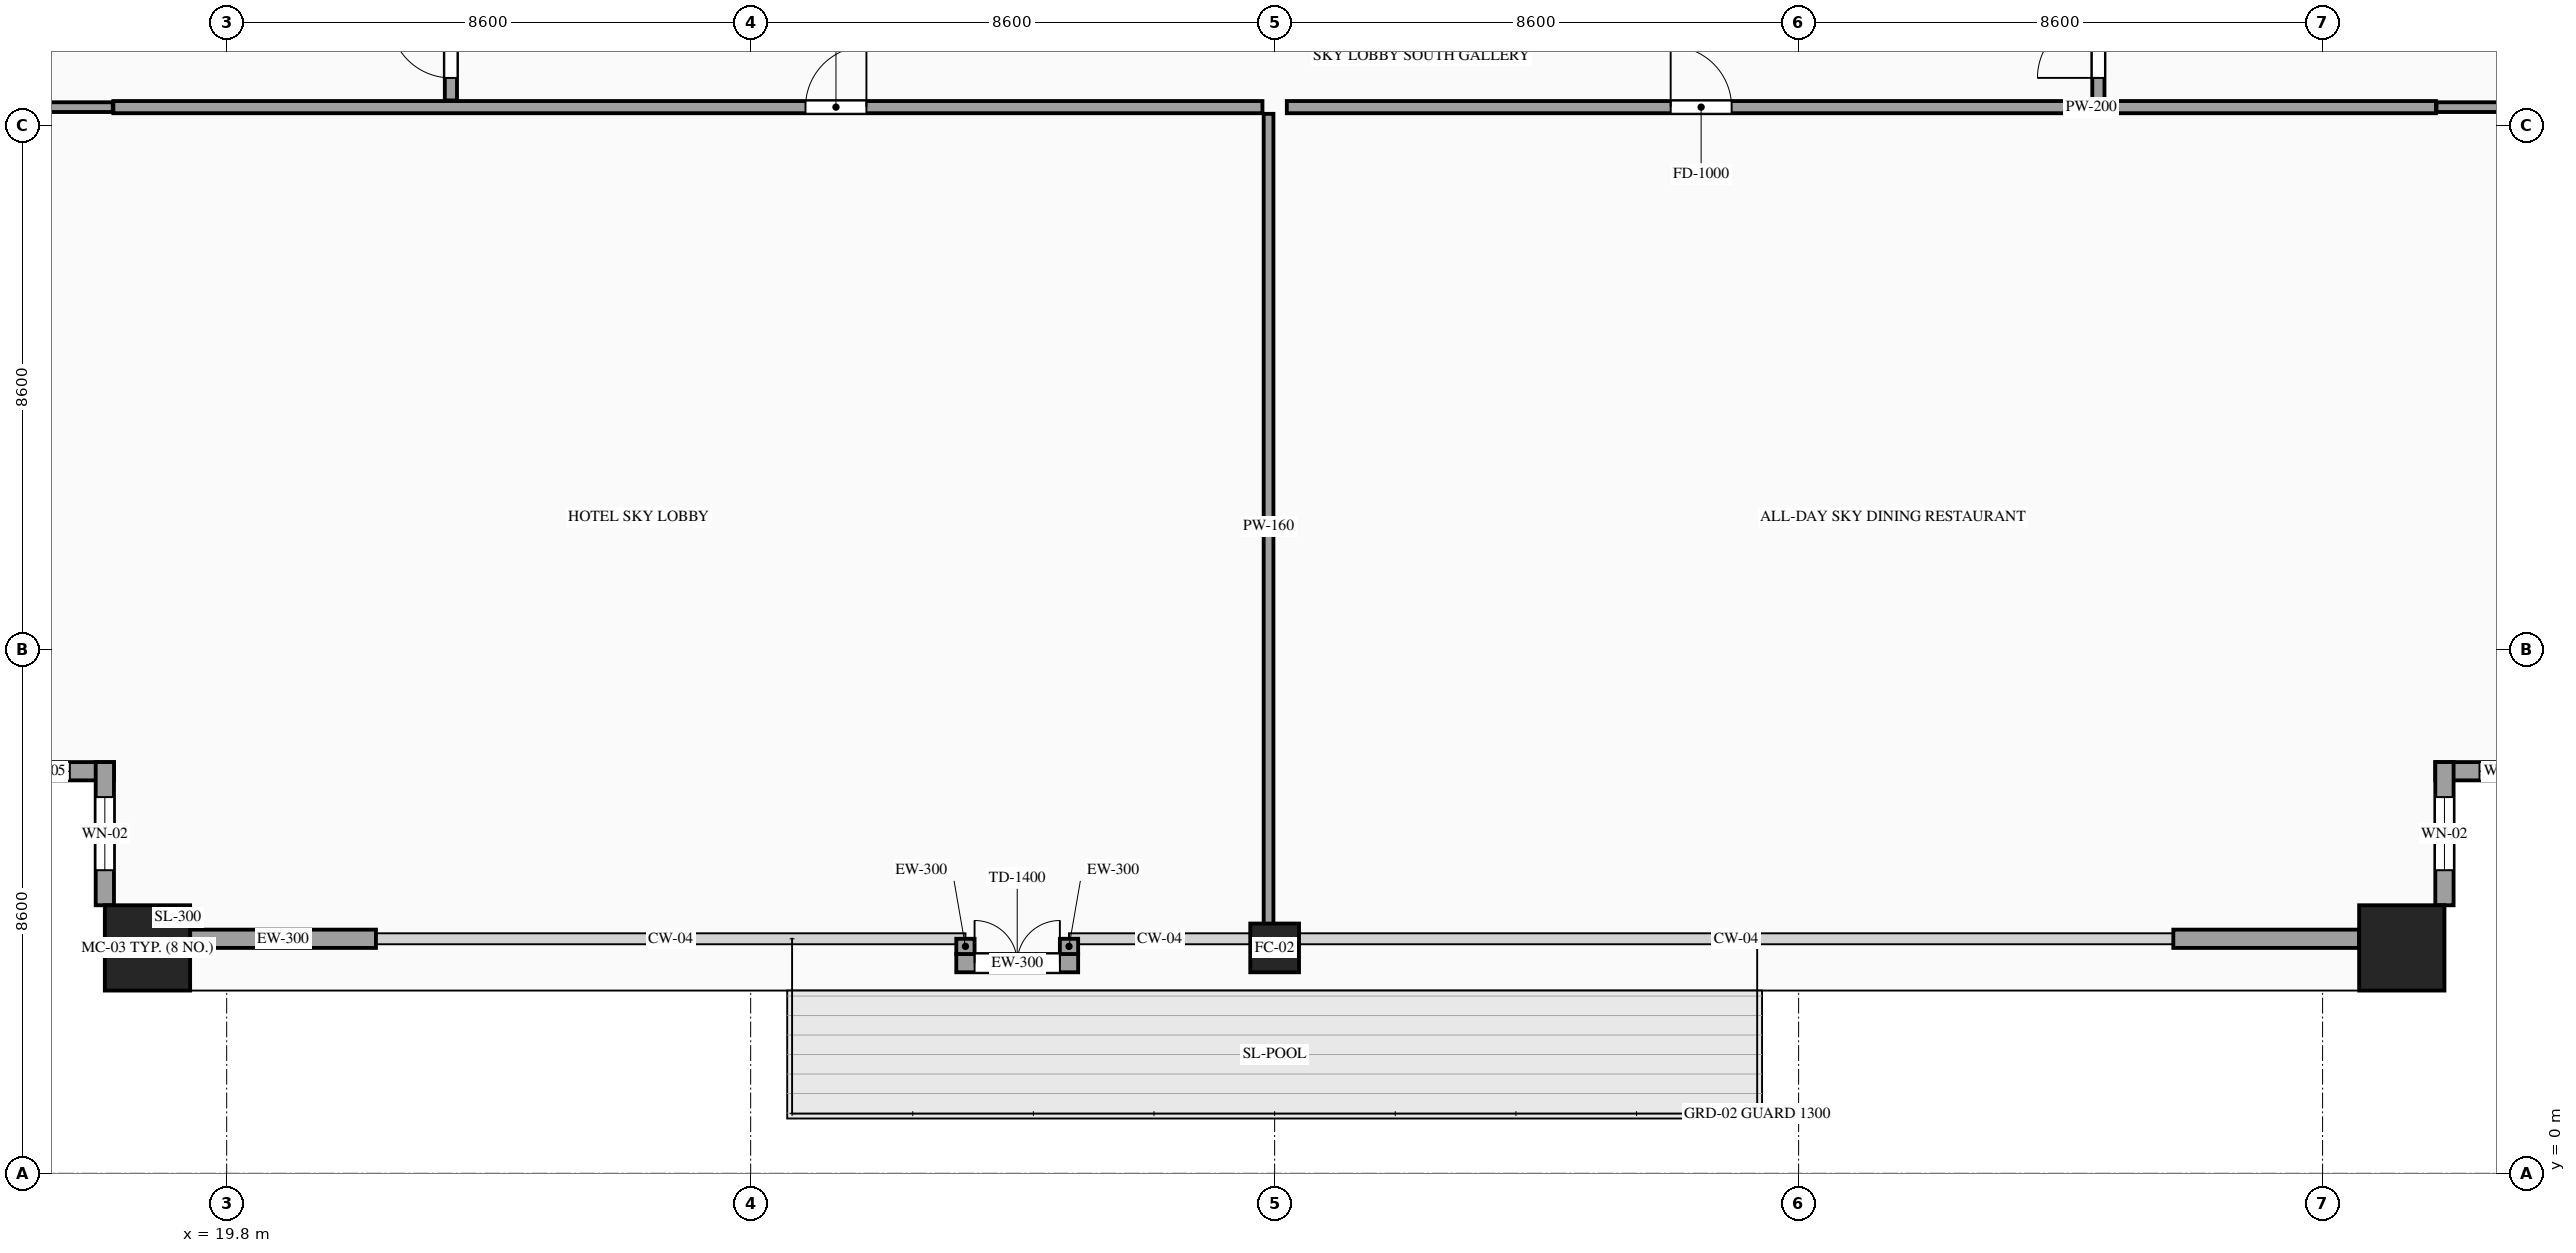
"""IFC4 building model, lengths in metres.
Left out: names, types, materials, properties, quantities, classifications, styles, units other than length and angle.
Written with IfcOpenShell. Run it as: python <this file> out.ifc"""

import sys

from ifc_helpers import new_model, si_unit, direction, frame, frame_2d, origin, origin_2d, place, context, subcontext, project, spatial, rectangle, hollow_rectangle, extrude, source, transform, mapped, element, fill, save


model = new_model("IFC4")
c1 = context("Model", 3, precision=1e-05, world=origin(), true_north=direction((0.0, 1.0)))
c2 = subcontext(c1, "Body", "Model", "MODEL_VIEW")
j1 = project(units=[si_unit("LENGTHUNIT", "METRE"), si_unit("PLANEANGLEUNIT", "RADIAN")], contexts=[c1])
p1 = place(None, origin())
s1 = spatial("IfcSite", under=j1, at=p1, CompositionType="ELEMENT")
p2 = place(p1, origin())
s2 = spatial("IfcBuilding", under=s1, at=p2, CompositionType="ELEMENT")
p3 = place(p2, frame((0.0, 0.0, 166.8)))
s3 = spatial("IfcBuildingStorey", under=s2, at=p3, CompositionType="ELEMENT", Elevation=166.8)
m1 = source(origin(), c2, "Body", "SweptSolid", [
    extrude(hollow_rectangle(XDim=1.4, YDim=1.4, WallThickness=0.06, at=origin_2d()), origin(), (0.0, 0.0, 1.0), 4.8),
])
p4 = place(p3, frame((18.5, 3.7, 0.0), z_axis=(0.0, 0.0, 1.0), x_axis=(1.0, 0.0, 0.0)))
e1 = element("IfcColumn", 1, at=p4, inside=s3, PredefinedType="COLUMN", context=c2, shape_type="MappedRepresentation", body=[
    mapped(m1, transform((0.0, 0.0, 0.0), scale=1.0)),
])
m2 = source(origin(), c2, "Body", "SweptSolid", [
    extrude(hollow_rectangle(XDim=0.8, YDim=0.8, WallThickness=0.036, at=origin_2d()), origin(), (0.0, 0.0, 1.0), 5.35),
])
p5 = place(p3, frame((37.0, 3.7, -0.55), z_axis=(0.0, 0.0, 1.0), x_axis=(1.0, 0.0, 0.0)))
e2 = element("IfcColumn", 2, at=p5, inside=s3, PredefinedType="COLUMN", context=c2, shape_type="MappedRepresentation", body=[
    mapped(m2, transform((0.0, 0.0, 0.0), scale=1.0)),
])
p6 = place(p3, frame((55.5, 3.7, 0.0), z_axis=(0.0, 0.0, 1.0), x_axis=(1.0, 0.0, 0.0)))
e3 = element("IfcColumn", 3, at=p6, inside=s3, PredefinedType="COLUMN", context=c2, shape_type="MappedRepresentation", body=[
    mapped(m1, transform((0.0, 0.0, 0.0), scale=1.0)),
])
p7 = place(p3, frame((15.6, 6.6, 0.0), z_axis=(0.0, 0.0, 1.0), x_axis=(1.0, 0.0, 0.0)))
e4 = element("IfcWall", 4, at=p7, inside=s3, PredefinedType="SOLIDWALL", context=c2, shape_type="SweptSolid", body=[
    extrude(rectangle(XDim=2.35, YDim=0.3, at=frame_2d((1.175, 0.0))), origin(), (0.0, 0.0, 1.0), 4.5),
])
p8 = place(p7, frame((0.725, 0.0, 0.85)))
e5 = element("IfcOpeningElement", 5, at=p8, cuts=e4, PredefinedType="OPENING", context=c2, shape_type="SweptSolid", body=[
    extrude(rectangle(XDim=0.9, YDim=1.5, at=frame_2d((0.45, 0.75))), frame((0.0, 0.165, 0.0), z_axis=(0.0, -1.0, 0.0), x_axis=(1.0, 0.0, 0.0)), (0.0, 0.0, 1.0), 0.33),
])
p9 = place(p3, frame((17.8, 6.75, 0.0), z_axis=(0.0, 0.0, 1.0), x_axis=(0.0, -1.0, 0.0)))
e6 = element("IfcWall", 6, at=p9, inside=s3, PredefinedType="SOLIDWALL", context=c2, shape_type="SweptSolid", body=[
    extrude(rectangle(XDim=2.35, YDim=0.3, at=frame_2d((1.175, 0.0))), origin(), (0.0, 0.0, 1.0), 4.5),
])
p10 = place(p9, frame((0.575, 0.0, 0.85)))
e7 = element("IfcOpeningElement", 7, at=p10, cuts=e6, PredefinedType="OPENING", context=c2, shape_type="SweptSolid", body=[
    extrude(rectangle(XDim=1.2, YDim=2.1, at=frame_2d((0.6, 1.05))), frame((0.0, 0.165, 0.0), z_axis=(0.0, -1.0, 0.0), x_axis=(1.0, 0.0, 0.0)), (0.0, 0.0, 1.0), 0.33),
])
p11 = place(p3, frame((56.05, 6.6, 0.0), z_axis=(0.0, 0.0, 1.0), x_axis=(1.0, 0.0, 0.0)))
e8 = element("IfcWall", 8, at=p11, inside=s3, PredefinedType="SOLIDWALL", context=c2, shape_type="SweptSolid", body=[
    extrude(rectangle(XDim=2.35, YDim=0.3, at=frame_2d((1.175, 0.0))), origin(), (0.0, 0.0, 1.0), 4.5),
])
p12 = place(p11, frame((0.725, 0.0, 0.85)))
e9 = element("IfcOpeningElement", 9, at=p12, cuts=e8, PredefinedType="OPENING", context=c2, shape_type="SweptSolid", body=[
    extrude(rectangle(XDim=0.9, YDim=1.5, at=frame_2d((0.45, 0.75))), frame((0.0, 0.165, 0.0), z_axis=(0.0, -1.0, 0.0), x_axis=(1.0, 0.0, 0.0)), (0.0, 0.0, 1.0), 0.33),
])
p13 = place(p3, frame((56.2, 4.4, 0.0), z_axis=(0.0, 0.0, 1.0), x_axis=(0.0, 1.0, 0.0)))
e10 = element("IfcWall", 10, at=p13, inside=s3, PredefinedType="SOLIDWALL", context=c2, shape_type="SweptSolid", body=[
    extrude(rectangle(XDim=2.35, YDim=0.3, at=frame_2d((1.175, 0.0))), origin(), (0.0, 0.0, 1.0), 4.5),
])
p14 = place(p13, frame((0.575, 0.0, 0.85)))
e11 = element("IfcOpeningElement", 11, at=p14, cuts=e10, PredefinedType="OPENING", context=c2, shape_type="SweptSolid", body=[
    extrude(rectangle(XDim=1.2, YDim=2.1, at=frame_2d((0.6, 1.05))), frame((0.0, 0.165, 0.0), z_axis=(0.0, -1.0, 0.0), x_axis=(1.0, 0.0, 0.0)), (0.0, 0.0, 1.0), 0.33),
])
m3 = source(origin(), c2, "Body", "SweptSolid", [
    extrude(rectangle(XDim=3.05, YDim=0.3, at=frame_2d((1.525, 0.0))), origin(), (0.0, 0.0, 1.0), 4.055),
])
for number, where, z_axis, x_axis in (
    (12, (19.2, 3.85, 0.0), (0.0, 0.0, 1.0), (1.0, 0.0, 0.0)),
    (13, (51.75, 3.85, 0.0), (0.0, 0.0, 1.0), (1.0, 0.0, 0.0)),
):
    element("IfcWall", number, at=place(p3, frame(where, z_axis=z_axis, x_axis=x_axis)), inside=s3, PredefinedType="SOLIDWALL", context=c2, shape_type="MappedRepresentation", body=[
        mapped(m3, transform((0.0, 0.0, 0.0), scale=1.0)),
    ])
p15 = place(p3, frame((31.775, 3.45, 0.0), z_axis=(0.0, 0.0, 1.0), x_axis=(1.0, 0.0, 0.0)))
e14 = element("IfcWall", 14, at=p15, inside=s3, PredefinedType="SOLIDWALL", context=c2, shape_type="SweptSolid", body=[
    extrude(rectangle(XDim=2.0, YDim=0.3, at=frame_2d((1.0, 0.0))), origin(), (0.0, 0.0, 1.0), 4.055),
])
p16 = place(p15, frame((0.3, 0.0, 0.0)))
e15 = element("IfcOpeningElement", 15, at=p16, cuts=e14, PredefinedType="OPENING", context=c2, shape_type="SweptSolid", body=[
    extrude(rectangle(XDim=1.4, YDim=2.3, at=frame_2d((0.7, 1.15))), frame((0.0, 0.165, 0.0), z_axis=(0.0, -1.0, 0.0), x_axis=(1.0, 0.0, 0.0)), (0.0, 0.0, 1.0), 0.33),
])
m4 = source(origin(), c2, "Body", "SweptSolid", [
    extrude(rectangle(XDim=0.25, YDim=0.3, at=frame_2d((0.125, 0.0))), origin(), (0.0, 0.0, 1.0), 4.5),
])
for number, where, z_axis, x_axis in (
    (16, (31.925, 3.85, 0.0), (0.0, 0.0, 1.0), (0.0, -1.0, 0.0)),
    (17, (33.625, 3.6, 0.0), (0.0, 0.0, 1.0), (0.0, 1.0, 0.0)),
):
    element("IfcWall", number, at=place(p3, frame(where, z_axis=z_axis, x_axis=x_axis)), inside=s3, PredefinedType="SOLIDWALL", context=c2, shape_type="MappedRepresentation", body=[
        mapped(m4, transform((0.0, 0.0, 0.0), scale=1.0)),
    ])
p17 = place(p3, frame((17.94, 17.5, 0.0), z_axis=(0.0, 0.0, 1.0), x_axis=(1.0, 0.0, 0.0)))
e18 = element("IfcWall", 18, at=p17, inside=s3, PredefinedType="PARTITIONING", context=c2, shape_type="SweptSolid", body=[
    extrude(rectangle(XDim=18.86, YDim=0.2, at=frame_2d((9.43, 0.0))), origin(), (0.0, 0.0, 1.0), 4.5),
])
p18 = place(p17, frame((11.36, 0.0, 0.0)))
e19 = element("IfcOpeningElement", 19, at=p18, cuts=e18, PredefinedType="OPENING", context=c2, shape_type="SweptSolid", body=[
    extrude(rectangle(XDim=1.0, YDim=2.2, at=frame_2d((0.5, 1.1))), frame((0.0, 0.115, 0.0), z_axis=(0.0, -1.0, 0.0), x_axis=(1.0, 0.0, 0.0)), (0.0, 0.0, 1.0), 0.23),
])
m5 = source(origin(), c2, "Body", "SweptSolid", [
    extrude(rectangle(XDim=13.54, YDim=0.16, at=frame_2d((6.77, 0.0))), origin(), (0.0, 0.0, 1.0), 3.907),
])
p19 = place(p3, frame((36.9, 3.85, 0.0), z_axis=(0.0, 0.0, 1.0), x_axis=(0.0, 1.0, 0.0)))
e20 = element("IfcWall", 20, at=p19, inside=s3, PredefinedType="PARTITIONING", context=c2, shape_type="MappedRepresentation", body=[
    mapped(m5, transform((0.0, 0.0, 0.0), scale=1.0)),
])
p20 = place(p3, frame((37.2, 17.5, 0.0), z_axis=(0.0, 0.0, 1.0), x_axis=(1.0, 0.0, 0.0)))
e21 = element("IfcWall", 21, at=p20, inside=s3, PredefinedType="PARTITIONING", context=c2, shape_type="SweptSolid", body=[
    extrude(rectangle(XDim=18.86, YDim=0.2, at=frame_2d((9.43, 0.0))), origin(), (0.0, 0.0, 1.0), 4.5),
])
p21 = place(p20, frame((6.3, 0.0, 0.0)))
e22 = element("IfcOpeningElement", 22, at=p21, cuts=e21, PredefinedType="OPENING", context=c2, shape_type="SweptSolid", body=[
    extrude(rectangle(XDim=1.0, YDim=2.2, at=frame_2d((0.5, 1.1))), frame((0.0, 0.115, 0.0), z_axis=(0.0, -1.0, 0.0), x_axis=(1.0, 0.0, 0.0)), (0.0, 0.0, 1.0), 0.23),
])
p22 = place(p3, frame((23.48, 17.61, 0.0), z_axis=(0.0, 0.0, 1.0), x_axis=(0.0, 1.0, 0.0)))
e23 = element("IfcWall", 23, at=p22, inside=s3, PredefinedType="PARTITIONING", context=c2, shape_type="SweptSolid", body=[
    extrude(rectangle(XDim=1.74, YDim=0.2, at=frame_2d((0.87, 0.0))), origin(), (0.0, 0.0, 1.0), 4.5),
])
p23 = place(p22, frame((0.37, 0.0, 0.0)))
e24 = element("IfcOpeningElement", 24, at=p23, cuts=e23, PredefinedType="OPENING", context=c2, shape_type="SweptSolid", body=[
    extrude(rectangle(XDim=1.0, YDim=2.2, at=frame_2d((0.5, 1.1))), frame((0.0, 0.115, 0.0), z_axis=(0.0, -1.0, 0.0), x_axis=(1.0, 0.0, 0.0)), (0.0, 0.0, 1.0), 0.23),
])
m6 = source(origin(), c2, "Body", "SweptSolid", [
    extrude(rectangle(XDim=2.88, YDim=0.16, at=frame_2d((1.44, 0.0))), origin(), (0.0, 0.0, 1.0), 4.5),
])
p24 = place(p3, frame((15.05, 17.5, 0.0), z_axis=(0.0, 0.0, 1.0), x_axis=(1.0, 0.0, 0.0)))
e25 = element("IfcWall", 25, at=p24, inside=s3, PredefinedType="PARTITIONING", context=c2, shape_type="MappedRepresentation", body=[
    mapped(m6, transform((0.0, 0.0, 0.0), scale=1.0)),
])
p25 = place(p3, frame((50.52, 17.61, 0.0), z_axis=(0.0, 0.0, 1.0), x_axis=(0.0, 1.0, 0.0)))
e26 = element("IfcWall", 26, at=p25, inside=s3, PredefinedType="PARTITIONING", context=c2, shape_type="SweptSolid", body=[
    extrude(rectangle(XDim=1.74, YDim=0.2, at=frame_2d((0.87, 0.0))), origin(), (0.0, 0.0, 1.0), 4.5),
])
p26 = place(p25, frame((0.37, 0.0, 0.0)))
e27 = element("IfcOpeningElement", 27, at=p26, cuts=e26, PredefinedType="OPENING", context=c2, shape_type="SweptSolid", body=[
    extrude(rectangle(XDim=1.0, YDim=2.2, at=frame_2d((0.5, 1.1))), frame((0.0, 0.115, 0.0), z_axis=(0.0, -1.0, 0.0), x_axis=(1.0, 0.0, 0.0)), (0.0, 0.0, 1.0), 0.23),
])
p27 = place(p3, frame((56.07, 17.5, 0.0), z_axis=(0.0, 0.0, 1.0), x_axis=(1.0, 0.0, 0.0)))
e28 = element("IfcWall", 28, at=p27, inside=s3, PredefinedType="PARTITIONING", context=c2, shape_type="MappedRepresentation", body=[
    mapped(m6, transform((0.0, 0.0, 0.0), scale=1.0)),
])
m7 = source(origin(), c2, "Body", "SweptSolid", [
    extrude(rectangle(XDim=0.9, YDim=1.5, at=frame_2d((0.45, 0.75))), frame((0.0, 0.03, 0.0), z_axis=(0.0, -1.0, 0.0), x_axis=(1.0, 0.0, 0.0)), (0.0, 0.0, 1.0), 0.06),
])
p28 = place(p8, origin())
e29 = element("IfcWindow", 29, at=p28, inside=s3, PartitioningType="SINGLE_PANEL", PredefinedType="WINDOW", context=c2, shape_type="MappedRepresentation", body=[
    mapped(m7, transform((0.0, 0.0, 0.0), scale=1.0)),
])
fill(e5, e29)
m8 = source(origin(), c2, "Body", "SweptSolid", [
    extrude(rectangle(XDim=1.2, YDim=2.1, at=frame_2d((0.6, 1.05))), frame((0.0, 0.03, 0.0), z_axis=(0.0, -1.0, 0.0), x_axis=(1.0, 0.0, 0.0)), (0.0, 0.0, 1.0), 0.06),
])
p29 = place(p10, origin())
e30 = element("IfcWindow", 30, at=p29, inside=s3, PartitioningType="SINGLE_PANEL", PredefinedType="WINDOW", context=c2, shape_type="MappedRepresentation", body=[
    mapped(m8, transform((0.0, 0.0, 0.0), scale=1.0)),
])
fill(e7, e30)
p30 = place(p12, origin())
e31 = element("IfcWindow", 31, at=p30, inside=s3, PartitioningType="SINGLE_PANEL", PredefinedType="WINDOW", context=c2, shape_type="MappedRepresentation", body=[
    mapped(m7, transform((0.0, 0.0, 0.0), scale=1.0)),
])
fill(e9, e31)
p31 = place(p14, origin())
e32 = element("IfcWindow", 32, at=p31, inside=s3, PartitioningType="SINGLE_PANEL", PredefinedType="WINDOW", context=c2, shape_type="MappedRepresentation", body=[
    mapped(m8, transform((0.0, 0.0, 0.0), scale=1.0)),
])
fill(e11, e32)
m9 = source(origin(), c2, "Body", "SweptSolid", [
    extrude(rectangle(XDim=1.4, YDim=2.3, at=frame_2d((0.7, 1.15))), frame((0.0, 0.025, 0.0), z_axis=(0.0, -1.0, 0.0), x_axis=(1.0, 0.0, 0.0)), (0.0, 0.0, 1.0), 0.05),
])
p32 = place(p16, origin())
e33 = element("IfcDoor", 33, at=p32, inside=s3, OperationType="DOUBLE_DOOR_SINGLE_SWING", PredefinedType="DOOR", context=c2, shape_type="MappedRepresentation", body=[
    mapped(m9, transform((0.0, 0.0, 0.0), scale=1.0)),
])
fill(e15, e33)
m10 = source(origin(), c2, "Body", "SweptSolid", [
    extrude(rectangle(XDim=1.0, YDim=2.2, at=frame_2d((0.5, 1.1))), frame((0.0, 0.025, 0.0), z_axis=(0.0, -1.0, 0.0), x_axis=(1.0, 0.0, 0.0)), (0.0, 0.0, 1.0), 0.05),
])
p33 = place(p18, origin())
e34 = element("IfcDoor", 34, at=p33, inside=s3, OperationType="SINGLE_SWING_RIGHT", PredefinedType="DOOR", context=c2, shape_type="MappedRepresentation", body=[
    mapped(m10, transform((0.0, 0.0, 0.0), scale=1.0)),
])
fill(e19, e34)
p34 = place(p21, origin())
e35 = element("IfcDoor", 35, at=p34, inside=s3, OperationType="SINGLE_SWING_LEFT", PredefinedType="DOOR", context=c2, shape_type="MappedRepresentation", body=[
    mapped(m10, transform((0.0, 0.0, 0.0), scale=1.0)),
])
fill(e22, e35)
p35 = place(p23, origin())
e36 = element("IfcDoor", 36, at=p35, inside=s3, OperationType="SINGLE_SWING_RIGHT", PredefinedType="DOOR", context=c2, shape_type="MappedRepresentation", body=[
    mapped(m10, transform((0.0, 0.0, 0.0), scale=1.0)),
])
fill(e24, e36)
p36 = place(p26, origin())
e37 = element("IfcDoor", 37, at=p36, inside=s3, OperationType="SINGLE_SWING_LEFT", PredefinedType="DOOR", context=c2, shape_type="MappedRepresentation", body=[
    mapped(m10, transform((0.0, 0.0, 0.0), scale=1.0)),
])
fill(e27, e37)
save(model, sys.argv[1])
